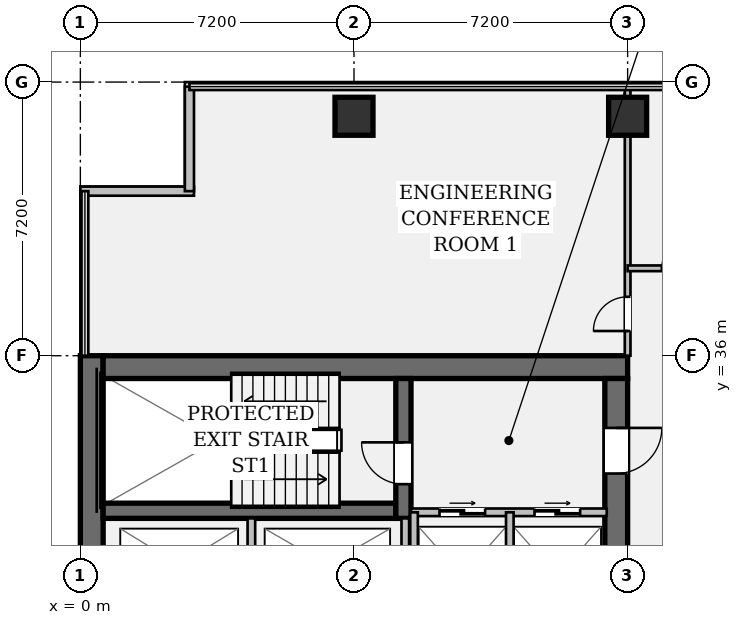
"""IFC4 building model, lengths in metres.
Left out: names, types, materials, properties, quantities, classifications, styles, units other than length and angle.
Written with IfcOpenShell. Run it as: python <this file> out.ifc"""

import sys

from ifc_helpers import new_model, si_unit, direction, frame, frame_2d, origin, origin_2d, place, context, subcontext, project, spatial, rectangle, hollow_rectangle, extrude, element, fill, save


model = new_model("IFC4")
c1 = context("Model", 3, precision=1e-05, world=origin(), true_north=direction((0.0, 1.0)))
c2 = subcontext(c1, "Body", "Model", "MODEL_VIEW")
j1 = project(units=[si_unit("LENGTHUNIT", "METRE"), si_unit("PLANEANGLEUNIT", "RADIAN")], contexts=[c1])
p1 = place(None, origin())
s1 = spatial("IfcSite", under=j1, at=p1, CompositionType="ELEMENT")
p2 = place(p1, origin())
s2 = spatial("IfcBuilding", under=s1, at=p2, CompositionType="ELEMENT")
p3 = place(p2, frame((0.0, 0.0, 69.65)))
s3 = spatial("IfcBuildingStorey", under=s2, at=p3, CompositionType="ELEMENT", Elevation=69.65)
p4 = place(p3, frame((0.3, 7.2, 0.0), z_axis=(0.0, 0.0, 1.0), x_axis=(0.0, 1.0, 0.0)))
e1 = element("IfcWall", 1, at=p4, inside=s3, PredefinedType="SHEAR", context=c2, shape_type="SweptSolid", body=[
    extrude(rectangle(XDim=28.8, YDim=0.6, at=frame_2d((14.4, 0.0))), origin(), (0.0, 0.0, 1.0), 3.57),
])
p5 = place(p3, frame((0.6, 35.7, 0.0), z_axis=(0.0, 0.0, 1.0), x_axis=(1.0, 0.0, 0.0)))
e2 = element("IfcWall", 2, at=p5, inside=s3, PredefinedType="SHEAR", context=c2, shape_type="SweptSolid", body=[
    extrude(rectangle(XDim=13.8, YDim=0.6, at=frame_2d((6.9, 0.0))), origin(), (0.0, 0.0, 1.0), 3.57),
])
p6 = place(p3, frame((14.1, 35.4, 0.0), z_axis=(0.0, 0.0, 1.0), x_axis=(0.0, -1.0, 0.0)))
e3 = element("IfcWall", 3, at=p6, inside=s3, PredefinedType="SHEAR", context=c2, shape_type="SweptSolid", body=[
    extrude(rectangle(XDim=27.6, YDim=0.6, at=frame_2d((13.8, 0.0))), origin(), (0.0, 0.0, 1.0), 3.57),
])
p7 = place(p6, frame((1.3, 0.0, 0.0)))
e4 = element("IfcOpeningElement", 4, at=p7, cuts=e3, PredefinedType="OPENING", context=c2, shape_type="SweptSolid", body=[
    extrude(rectangle(XDim=1.2, YDim=2.15, at=frame_2d((0.6, 1.075))), frame((0.0, 0.312, 0.0), z_axis=(0.0, -1.0, 0.0), x_axis=(1.0, 0.0, 0.0)), (0.0, 0.0, 1.0), 0.624),
])
p8 = place(p6, frame((25.25, 0.0, 0.0)))
e5 = element("IfcOpeningElement", 5, at=p8, cuts=e3, PredefinedType="OPENING", context=c2, shape_type="SweptSolid", body=[
    extrude(rectangle(XDim=1.2, YDim=2.15, at=frame_2d((0.6, 1.075))), frame((0.0, 0.312, 0.0), z_axis=(0.0, -1.0, 0.0), x_axis=(1.0, 0.0, 0.0)), (0.0, 0.0, 1.0), 0.624),
])
p9 = place(p6, frame((14.6, 0.0, 0.0)))
e6 = element("IfcOpeningElement", 6, at=p9, cuts=e3, PredefinedType="OPENING", context=c2, shape_type="SweptSolid", body=[
    extrude(rectangle(XDim=1.6, YDim=2.2, at=frame_2d((0.8, 1.1))), frame((0.0, 0.312, 0.0), z_axis=(0.0, -1.0, 0.0), x_axis=(1.0, 0.0, 0.0)), (0.0, 0.0, 1.0), 0.624),
])
p10 = place(p3, frame((0.6, 31.92, 0.0), z_axis=(0.0, 0.0, 1.0), x_axis=(1.0, 0.0, 0.0)))
e7 = element("IfcWall", 7, at=p10, inside=s3, PredefinedType="SHEAR", context=c2, shape_type="SweptSolid", body=[
    extrude(rectangle(XDim=7.7, YDim=0.4, at=frame_2d((3.85, 0.0))), origin(), (0.0, 0.0, 1.0), 3.57),
])
p11 = place(p3, frame((8.5, 31.72, 0.0), z_axis=(0.0, 0.0, 1.0), x_axis=(0.0, 1.0, 0.0)))
e8 = element("IfcWall", 8, at=p11, inside=s3, PredefinedType="SHEAR", context=c2, shape_type="SweptSolid", body=[
    extrude(rectangle(XDim=3.68, YDim=0.4, at=frame_2d((1.84, 0.0))), origin(), (0.0, 0.0, 1.0), 3.57),
])
p12 = place(p11, frame((0.9, 0.0, 0.0)))
e9 = element("IfcOpeningElement", 9, at=p12, cuts=e8, PredefinedType="OPENING", context=c2, shape_type="SweptSolid", body=[
    extrude(rectangle(XDim=1.1, YDim=2.15, at=frame_2d((0.55, 1.075))), frame((0.0, 0.212, 0.0), z_axis=(0.0, -1.0, 0.0), x_axis=(1.0, 0.0, 0.0)), (0.0, 0.0, 1.0), 0.424),
])
for number, where, z_axis, x_axis in (
    (10, (7.2, 42.3, 0.0), (0.0, 0.0, 1.0), (1.0, 0.0, 0.0)),
    (11, (14.4, 42.3, 0.0), (0.0, 0.0, 1.0), (1.0, 0.0, 0.0)),
):
    element("IfcColumn", number, at=place(p3, frame(where, z_axis=z_axis, x_axis=x_axis)), inside=s3, PredefinedType="COLUMN", context=c2, shape_type="SweptSolid", body=[
        extrude(hollow_rectangle(XDim=1.0, YDim=1.0, WallThickness=0.065, at=origin_2d()), origin(), (0.0, 0.0, 1.0), 3.57),
    ])
p13 = place(p3, frame((0.0, 40.33, 0.0), z_axis=(0.0, 0.0, 1.0), x_axis=(1.0, 0.0, 0.0)))
e12 = element("IfcWall", 12, at=p13, inside=s3, PredefinedType="STANDARD", context=c2, shape_type="SweptSolid", body=[
    extrude(rectangle(XDim=2.99, YDim=0.24, at=frame_2d((1.495, 0.0))), origin(), (0.0, 0.0, 1.0), 3.57),
])
p14 = place(p3, frame((2.87, 40.33, 0.0), z_axis=(0.0, 0.0, 1.0), x_axis=(0.0, 1.0, 0.0)))
e13 = element("IfcWall", 13, at=p14, inside=s3, PredefinedType="STANDARD", context=c2, shape_type="SweptSolid", body=[
    extrude(rectangle(XDim=2.75, YDim=0.24, at=frame_2d((1.375, 0.0))), origin(), (0.0, 0.0, 1.0), 3.57),
])
p15 = place(p3, frame((8.7, 31.88, 0.0), z_axis=(0.0, 0.0, 1.0), x_axis=(1.0, 0.0, 0.0)))
e14 = element("IfcWall", 14, at=p15, inside=s3, PredefinedType="PARTITIONING", context=c2, shape_type="SweptSolid", body=[
    extrude(rectangle(XDim=5.15, YDim=0.2, at=frame_2d((2.575, 0.0))), origin(), (0.0, 0.0, 1.0), 3.57),
])
p16 = place(p15, frame((0.75, 0.0, 0.0)))
e15 = element("IfcOpeningElement", 15, at=p16, cuts=e14, PredefinedType="OPENING", context=c2, shape_type="SweptSolid", body=[
    extrude(rectangle(XDim=1.2, YDim=2.2, at=frame_2d((0.6, 1.1))), frame((0.0, 0.112, 0.0), z_axis=(0.0, -1.0, 0.0), x_axis=(1.0, 0.0, 0.0)), (0.0, 0.0, 1.0), 0.224),
])
p17 = place(p15, frame((3.25, 0.0, 0.0)))
e16 = element("IfcOpeningElement", 16, at=p17, cuts=e14, PredefinedType="OPENING", context=c2, shape_type="SweptSolid", body=[
    extrude(rectangle(XDim=1.2, YDim=2.2, at=frame_2d((0.6, 1.1))), frame((0.0, 0.112, 0.0), z_axis=(0.0, -1.0, 0.0), x_axis=(1.0, 0.0, 0.0)), (0.0, 0.0, 1.0), 0.224),
])
for number, where, z_axis, x_axis in (
    (17, (8.78, 28.78, 0.0), (0.0, 0.0, 1.0), (0.0, 1.0, 0.0)),
    (18, (11.3, 28.78, 0.0), (0.0, 0.0, 1.0), (0.0, 1.0, 0.0)),
):
    element("IfcWall", number, at=place(p3, frame(where, z_axis=z_axis, x_axis=x_axis)), inside=s3, PredefinedType="PARTITIONING", context=c2, shape_type="SweptSolid", body=[
        extrude(rectangle(XDim=3.1, YDim=0.2, at=frame_2d((1.55, 0.0))), origin(), (0.0, 0.0, 1.0), 3.57),
    ])
for number, where, z_axis, x_axis in (
    (19, (4.5, 28.78, 0.0), (0.0, 0.0, 1.0), (0.0, 1.0, 0.0)),
    (20, (8.55, 28.78, 0.0), (0.0, 0.0, 1.0), (0.0, 1.0, 0.0)),
):
    element("IfcWall", number, at=place(p3, frame(where, z_axis=z_axis, x_axis=x_axis)), inside=s3, PredefinedType="PARTITIONING", context=c2, shape_type="SweptSolid", body=[
        extrude(rectangle(XDim=2.94, YDim=0.2, at=frame_2d((1.47, 0.0))), origin(), (0.0, 0.0, 1.0), 3.57),
    ])
p18 = place(p3, frame((14.4, 36.0, 0.0), z_axis=(0.0, 0.0, 1.0), x_axis=(0.0, 1.0, 0.0)))
e21 = element("IfcWall", 21, at=p18, inside=s3, PredefinedType="PARTITIONING", context=c2, shape_type="SweptSolid", body=[
    extrude(rectangle(XDim=7.08, YDim=0.15, at=frame_2d((3.54, 0.0))), origin(), (0.0, 0.0, 1.0), 2.699),
])
p19 = place(p18, frame((0.65, 0.0, 0.0)))
e22 = element("IfcOpeningElement", 22, at=p19, cuts=e21, PredefinedType="OPENING", context=c2, shape_type="SweptSolid", body=[
    extrude(rectangle(XDim=0.9, YDim=2.15, at=frame_2d((0.45, 1.075))), frame((0.0, 0.087, 0.0), z_axis=(0.0, -1.0, 0.0), x_axis=(1.0, 0.0, 0.0)), (0.0, 0.0, 1.0), 0.174),
])
p20 = place(p3, frame((14.4, 38.3, 0.0), z_axis=(0.0, 0.0, 1.0), x_axis=(1.0, 0.0, 0.0)))
e23 = element("IfcWall", 23, at=p20, inside=s3, PredefinedType="PARTITIONING", context=c2, shape_type="SweptSolid", body=[
    extrude(rectangle(XDim=2.95, YDim=0.15, at=frame_2d((1.475, 0.0))), origin(), (0.0, 0.0, 1.0), 2.699),
])
p21 = place(p20, frame((0.9, 0.0, 0.0)))
e24 = element("IfcOpeningElement", 24, at=p21, cuts=e23, PredefinedType="OPENING", context=c2, shape_type="SweptSolid", body=[
    extrude(rectangle(XDim=0.95, YDim=2.15, at=frame_2d((0.475, 1.075))), frame((0.0, 0.087, 0.0), z_axis=(0.0, -1.0, 0.0), x_axis=(1.0, 0.0, 0.0)), (0.0, 0.0, 1.0), 0.174),
])
p22 = place(p12, origin())
e25 = element("IfcDoor", 25, at=p22, inside=s3, OperationType="SINGLE_SWING_RIGHT", PredefinedType="DOOR", context=c2, shape_type="SweptSolid", body=[
    extrude(rectangle(XDim=1.1, YDim=2.15, at=frame_2d((0.55, 1.075))), frame((0.0, 0.025, 0.0), z_axis=(0.0, -1.0, 0.0), x_axis=(1.0, 0.0, 0.0)), (0.0, 0.0, 1.0), 0.05),
])
fill(e9, e25)
p23 = place(p7, origin())
e26 = element("IfcDoor", 26, at=p23, inside=s3, OperationType="SINGLE_SWING_LEFT", PredefinedType="DOOR", context=c2, shape_type="SweptSolid", body=[
    extrude(rectangle(XDim=1.2, YDim=2.15, at=frame_2d((0.6, 1.075))), frame((0.0, 0.025, 0.0), z_axis=(0.0, -1.0, 0.0), x_axis=(1.0, 0.0, 0.0)), (0.0, 0.0, 1.0), 0.05),
])
fill(e4, e26)
p24 = place(p16, origin())
e27 = element("IfcDoor", 27, at=p24, inside=s3, OperationType="DOUBLE_DOOR_SLIDING", PredefinedType="DOOR", context=c2, shape_type="SweptSolid", body=[
    extrude(rectangle(XDim=1.2, YDim=2.2, at=frame_2d((0.6, 1.1))), frame((0.0, 0.025, 0.0), z_axis=(0.0, -1.0, 0.0), x_axis=(1.0, 0.0, 0.0)), (0.0, 0.0, 1.0), 0.05),
])
fill(e15, e27)
p25 = place(p17, origin())
e28 = element("IfcDoor", 28, at=p25, inside=s3, OperationType="DOUBLE_DOOR_SLIDING", PredefinedType="DOOR", context=c2, shape_type="SweptSolid", body=[
    extrude(rectangle(XDim=1.2, YDim=2.2, at=frame_2d((0.6, 1.1))), frame((0.0, 0.025, 0.0), z_axis=(0.0, -1.0, 0.0), x_axis=(1.0, 0.0, 0.0)), (0.0, 0.0, 1.0), 0.05),
])
fill(e16, e28)
p26 = place(p19, origin())
e29 = element("IfcDoor", 29, at=p26, inside=s3, OperationType="SINGLE_SWING_LEFT", PredefinedType="DOOR", context=c2, shape_type="SweptSolid", body=[
    extrude(rectangle(XDim=0.9, YDim=2.15, at=frame_2d((0.45, 1.075))), frame((0.0, 0.025, 0.0), z_axis=(0.0, -1.0, 0.0), x_axis=(1.0, 0.0, 0.0)), (0.0, 0.0, 1.0), 0.05),
])
fill(e22, e29)
p27 = place(p21, origin())
e30 = element("IfcDoor", 30, at=p27, inside=s3, OperationType="SINGLE_SWING_RIGHT", PredefinedType="DOOR", context=c2, shape_type="SweptSolid", body=[
    extrude(rectangle(XDim=0.95, YDim=2.15, at=frame_2d((0.475, 1.075))), frame((0.0, 0.025, 0.0), z_axis=(0.0, -1.0, 0.0), x_axis=(1.0, 0.0, 0.0)), (0.0, 0.0, 1.0), 0.05),
])
fill(e24, e30)
save(model, sys.argv[1])
